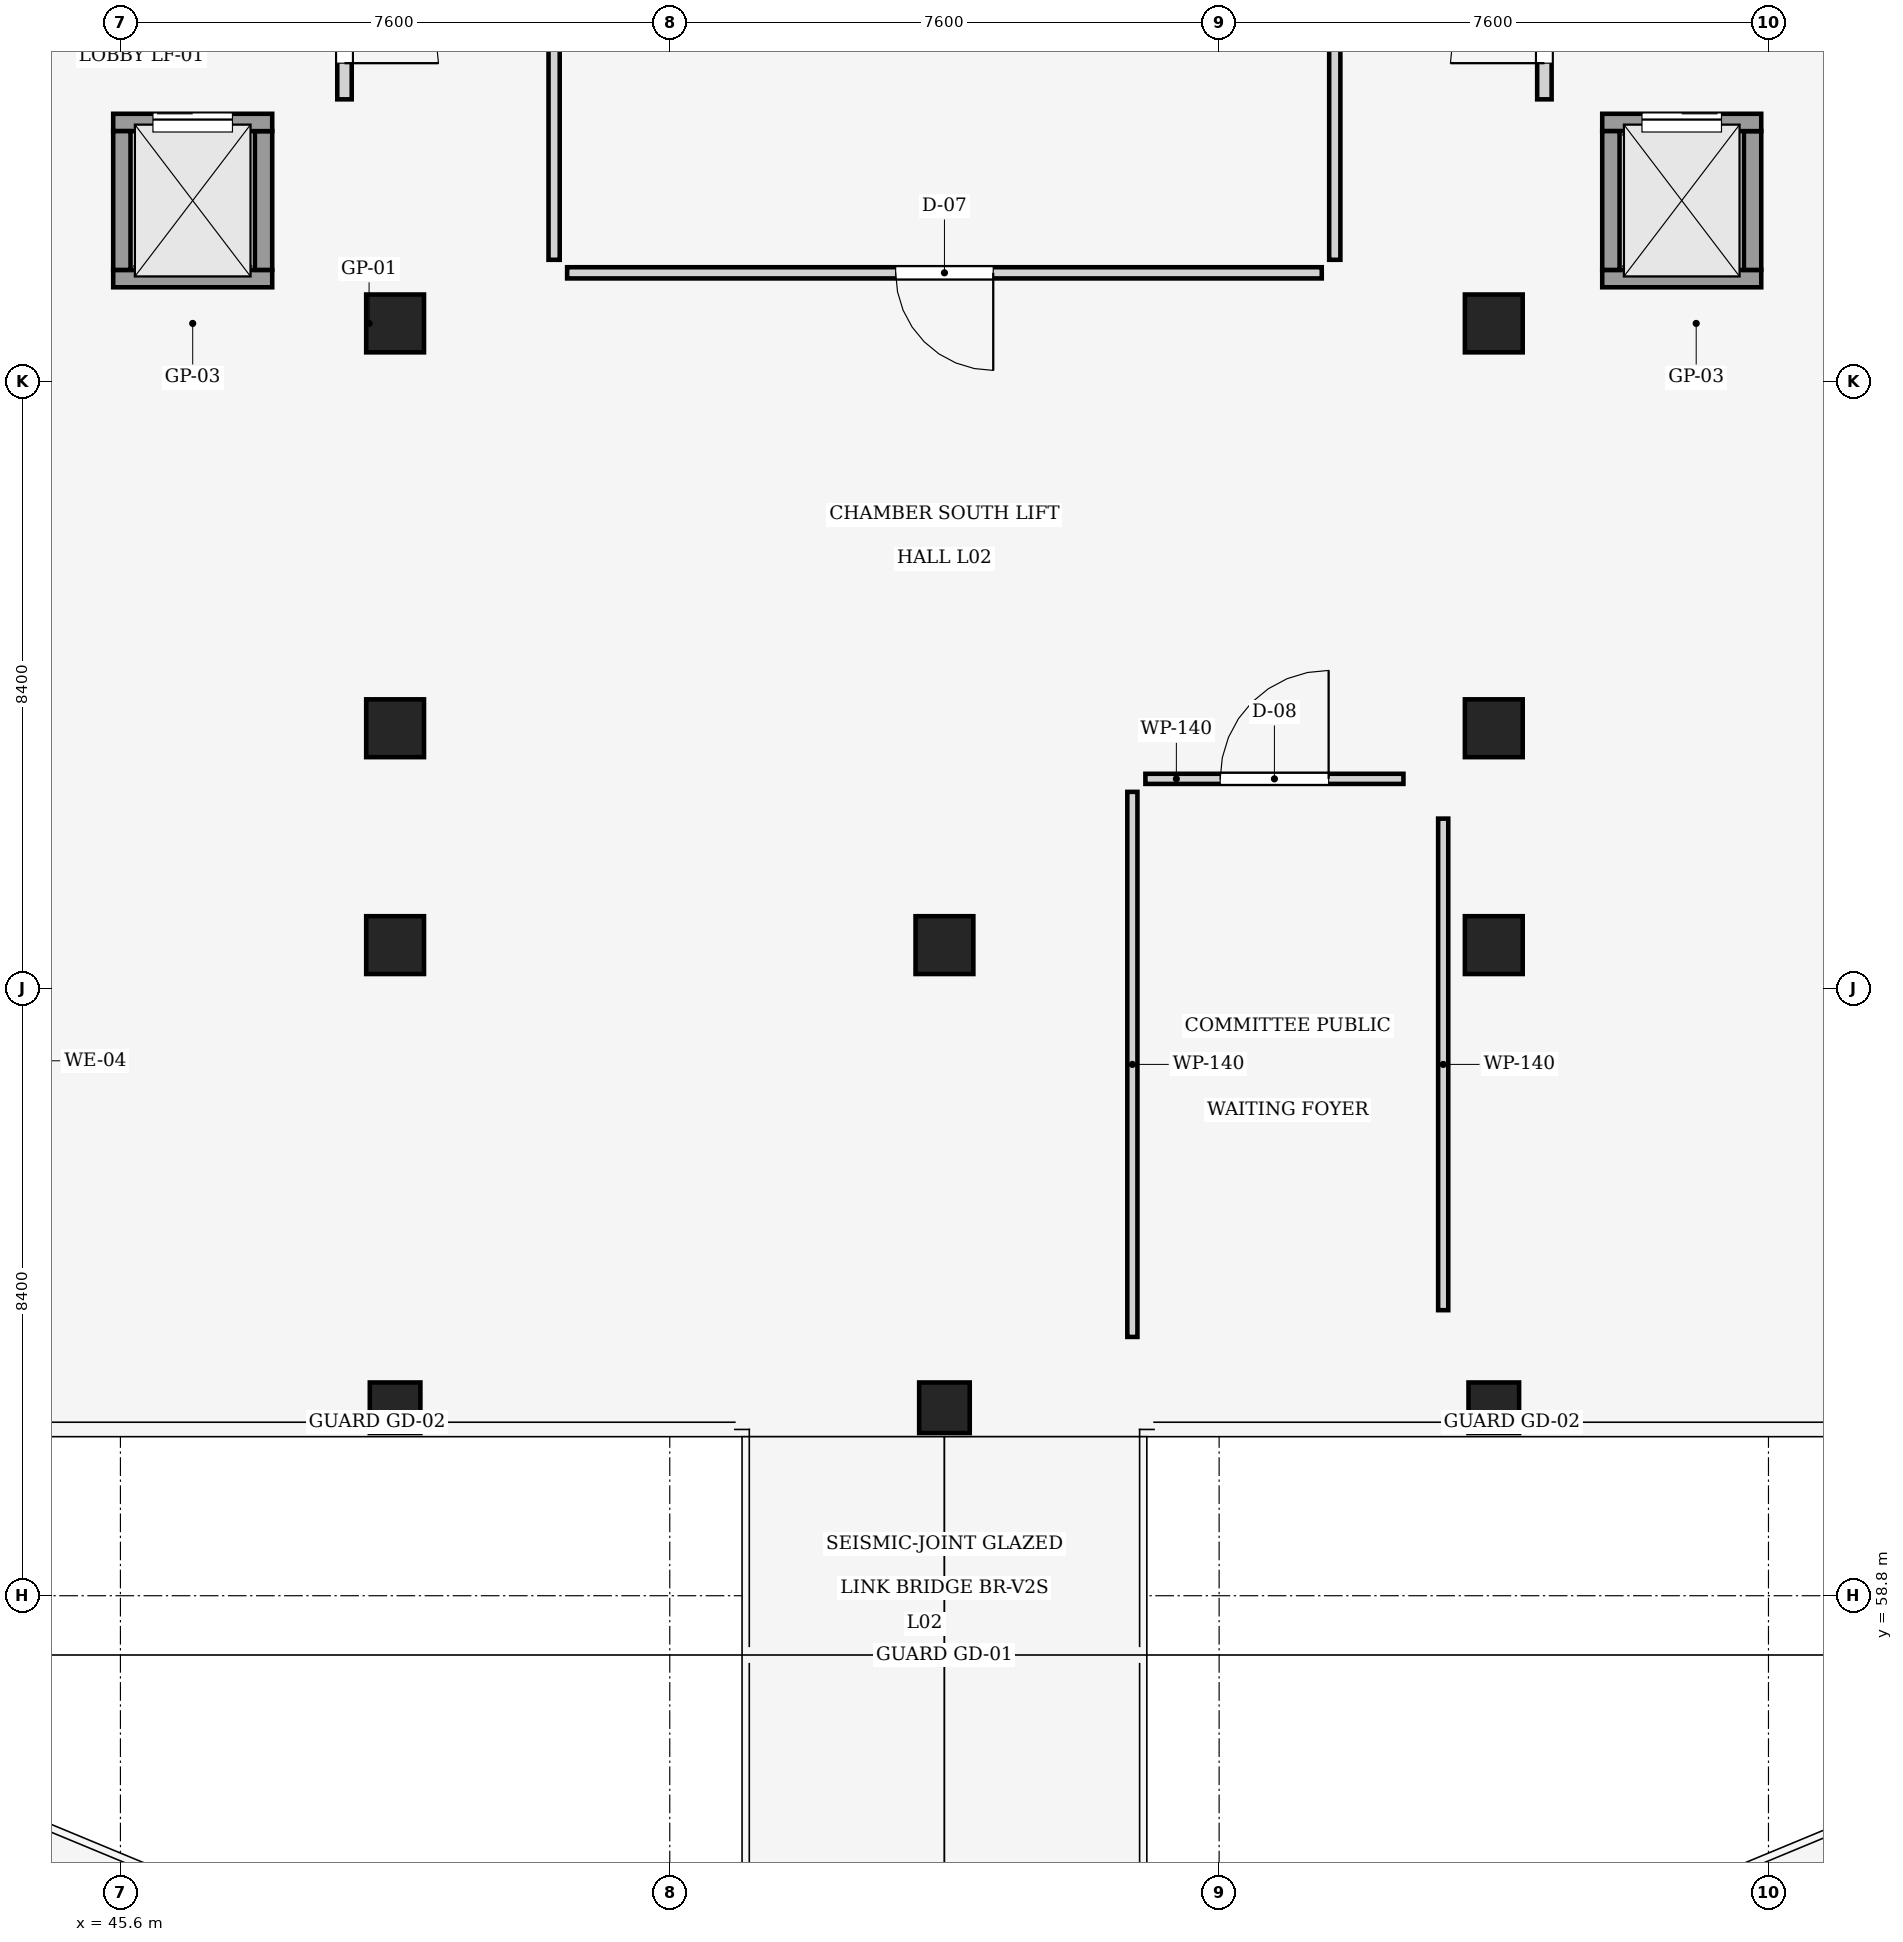
"""IFC4 building model, lengths in metres.
Left out: names, types, materials, properties, quantities, classifications, styles, units other than length and angle.
Written with IfcOpenShell. Run it as: python <this file> out.ifc"""

import sys

from ifc_helpers import new_model, si_unit, direction, frame, frame_2d, origin, origin_2d, place, context, subcontext, project, spatial, rectangle, extrude, element, fill, save


model = new_model("IFC4")
c1 = context("Model", 3, precision=1e-05, world=origin(), true_north=direction((0.0, 1.0)))
c2 = subcontext(c1, "Body", "Model", "MODEL_VIEW")
j1 = project(units=[si_unit("LENGTHUNIT", "METRE"), si_unit("PLANEANGLEUNIT", "RADIAN")], contexts=[c1])
p1 = place(None, origin())
s1 = spatial("IfcSite", under=j1, at=p1, CompositionType="ELEMENT")
p2 = place(p1, origin())
s2 = spatial("IfcBuilding", under=s1, at=p2, CompositionType="ELEMENT")
p3 = place(p2, frame((0.0, 0.0, 9.15)))
s3 = spatial("IfcBuildingStorey", under=s2, at=p3, CompositionType="ELEMENT", Elevation=9.15)
for number, where, z_axis, x_axis in (
    (1, (49.4, 70.8, 0.0), (0.0, 0.0, 1.0), (1.0, 0.0, 0.0)),
    (2, (49.4, 76.4, 0.0), (0.0, 0.0, 1.0), (1.0, 0.0, 0.0)),
    (3, (64.6, 70.8, 0.0), (0.0, 0.0, 1.0), (1.0, 0.0, 0.0)),
    (4, (64.6, 76.4, 0.0), (0.0, 0.0, 1.0), (1.0, 0.0, 0.0)),
    (5, (49.4, 67.8, 0.0), (0.0, 0.0, 1.0), (1.0, 0.0, 0.0)),
    (6, (57.0, 67.8, 0.0), (0.0, 0.0, 1.0), (1.0, 0.0, 0.0)),
    (7, (64.6, 67.8, 0.0), (0.0, 0.0, 1.0), (1.0, 0.0, 0.0)),
):
    element("IfcColumn", number, at=place(p3, frame(where, z_axis=z_axis, x_axis=x_axis)), inside=s3, PredefinedType="COLUMN", context=c2, shape_type="SweptSolid", body=[
        extrude(rectangle(XDim=0.8, YDim=0.8, at=origin_2d()), origin(), (0.0, 0.0, 1.0), 4.05),
    ])
for number, where, z_axis, x_axis in (
    (8, (49.4, 61.4, 0.0), (0.0, 0.0, 1.0), (1.0, 0.0, 0.0)),
    (9, (57.0, 61.4, 0.0), (0.0, 0.0, 1.0), (1.0, 0.0, 0.0)),
    (10, (64.6, 61.4, 0.0), (0.0, 0.0, 1.0), (1.0, 0.0, 0.0)),
):
    element("IfcColumn", number, at=place(p3, frame(where, z_axis=z_axis, x_axis=x_axis)), inside=s3, PredefinedType="COLUMN", context=c2, shape_type="SweptSolid", body=[
        extrude(rectangle(XDim=0.7, YDim=0.7, at=origin_2d()), origin(), (0.0, 0.0, 1.0), 4.05),
    ])
p4 = place(p3, frame((47.7, 77.02, 0.0), z_axis=(0.0, 0.0, 1.0), x_axis=(-1.0, 0.0, 0.0)))
e11 = element("IfcWall", 11, at=p4, inside=s3, PredefinedType="SHEAR", context=c2, shape_type="SweptSolid", body=[
    extrude(rectangle(XDim=2.2, YDim=0.24, at=frame_2d((1.1, 0.0))), origin(), (0.0, 0.0, 1.0), 4.05),
])
p5 = place(p3, frame((47.58, 79.06, 0.0), z_axis=(0.0, 0.0, 1.0), x_axis=(0.0, -1.0, 0.0)))
e12 = element("IfcWall", 12, at=p5, inside=s3, PredefinedType="SHEAR", context=c2, shape_type="SweptSolid", body=[
    extrude(rectangle(XDim=1.92, YDim=0.24, at=frame_2d((0.96, 0.0))), origin(), (0.0, 0.0, 1.0), 4.05),
])
p6 = place(p3, frame((45.5, 79.18, 0.0), z_axis=(0.0, 0.0, 1.0), x_axis=(1.0, 0.0, 0.0)))
e13 = element("IfcWall", 13, at=p6, inside=s3, PredefinedType="SHEAR", context=c2, shape_type="SweptSolid", body=[
    extrude(rectangle(XDim=2.2, YDim=0.24, at=frame_2d((1.1, 0.0))), origin(), (0.0, 0.0, 1.0), 4.05),
])
p7 = place(p6, frame((0.55, 0.0, 0.0)))
e14 = element("IfcOpeningElement", 14, at=p7, cuts=e13, PredefinedType="OPENING", context=c2, shape_type="SweptSolid", body=[
    extrude(rectangle(XDim=1.1, YDim=2.15, at=frame_2d((0.55, 1.075))), frame((0.0, 0.13, 0.0), z_axis=(0.0, -1.0, 0.0), x_axis=(1.0, 0.0, 0.0)), (0.0, 0.0, 1.0), 0.26),
])
p8 = place(p3, frame((45.62, 77.14, 0.0), z_axis=(0.0, 0.0, 1.0), x_axis=(0.0, 1.0, 0.0)))
e15 = element("IfcWall", 15, at=p8, inside=s3, PredefinedType="SHEAR", context=c2, shape_type="SweptSolid", body=[
    extrude(rectangle(XDim=1.92, YDim=0.24, at=frame_2d((0.96, 0.0))), origin(), (0.0, 0.0, 1.0), 4.05),
])
p9 = place(p3, frame((48.7, 81.8, 0.0), z_axis=(0.0, 0.0, 1.0), x_axis=(0.0, -1.0, 0.0)))
e16 = element("IfcWall", 16, at=p9, inside=s3, PredefinedType="PARTITIONING", context=c2, shape_type="SweptSolid", body=[
    extrude(rectangle(XDim=2.3, YDim=0.2, at=frame_2d((1.15, 0.0))), origin(), (0.0, 0.0, 1.0), 2.9),
])
p10 = place(p9, frame((0.5, 0.0, 0.0)))
e17 = element("IfcOpeningElement", 17, at=p10, cuts=e16, PredefinedType="OPENING", context=c2, shape_type="SweptSolid", body=[
    extrude(rectangle(XDim=1.3, YDim=2.2, at=frame_2d((0.65, 1.1))), frame((0.0, 0.11, 0.0), z_axis=(0.0, -1.0, 0.0), x_axis=(1.0, 0.0, 0.0)), (0.0, 0.0, 1.0), 0.22),
])
p11 = place(p3, frame((68.3, 77.02, 0.0), z_axis=(0.0, 0.0, 1.0), x_axis=(-1.0, 0.0, 0.0)))
e18 = element("IfcWall", 18, at=p11, inside=s3, PredefinedType="SHEAR", context=c2, shape_type="SweptSolid", body=[
    extrude(rectangle(XDim=2.2, YDim=0.24, at=frame_2d((1.1, 0.0))), origin(), (0.0, 0.0, 1.0), 4.05),
])
p12 = place(p3, frame((68.18, 79.06, 0.0), z_axis=(0.0, 0.0, 1.0), x_axis=(0.0, -1.0, 0.0)))
e19 = element("IfcWall", 19, at=p12, inside=s3, PredefinedType="SHEAR", context=c2, shape_type="SweptSolid", body=[
    extrude(rectangle(XDim=1.92, YDim=0.24, at=frame_2d((0.96, 0.0))), origin(), (0.0, 0.0, 1.0), 4.05),
])
p13 = place(p3, frame((66.1, 79.18, 0.0), z_axis=(0.0, 0.0, 1.0), x_axis=(1.0, 0.0, 0.0)))
e20 = element("IfcWall", 20, at=p13, inside=s3, PredefinedType="SHEAR", context=c2, shape_type="SweptSolid", body=[
    extrude(rectangle(XDim=2.2, YDim=0.24, at=frame_2d((1.1, 0.0))), origin(), (0.0, 0.0, 1.0), 4.05),
])
p14 = place(p13, frame((0.55, 0.0, 0.0)))
e21 = element("IfcOpeningElement", 21, at=p14, cuts=e20, PredefinedType="OPENING", context=c2, shape_type="SweptSolid", body=[
    extrude(rectangle(XDim=1.1, YDim=2.15, at=frame_2d((0.55, 1.075))), frame((0.0, 0.13, 0.0), z_axis=(0.0, -1.0, 0.0), x_axis=(1.0, 0.0, 0.0)), (0.0, 0.0, 1.0), 0.26),
])
p15 = place(p3, frame((66.22, 77.14, 0.0), z_axis=(0.0, 0.0, 1.0), x_axis=(0.0, 1.0, 0.0)))
e22 = element("IfcWall", 22, at=p15, inside=s3, PredefinedType="SHEAR", context=c2, shape_type="SweptSolid", body=[
    extrude(rectangle(XDim=1.92, YDim=0.24, at=frame_2d((0.96, 0.0))), origin(), (0.0, 0.0, 1.0), 4.05),
])
p16 = place(p3, frame((65.3, 79.5, 0.0), z_axis=(0.0, 0.0, 1.0), x_axis=(0.0, 1.0, 0.0)))
e23 = element("IfcWall", 23, at=p16, inside=s3, PredefinedType="PARTITIONING", context=c2, shape_type="SweptSolid", body=[
    extrude(rectangle(XDim=2.3, YDim=0.2, at=frame_2d((1.15, 0.0))), origin(), (0.0, 0.0, 1.0), 2.9),
])
p17 = place(p16, frame((0.5, 0.0, 0.0)))
e24 = element("IfcOpeningElement", 24, at=p17, cuts=e23, PredefinedType="OPENING", context=c2, shape_type="SweptSolid", body=[
    extrude(rectangle(XDim=1.3, YDim=2.2, at=frame_2d((0.65, 1.1))), frame((0.0, 0.11, 0.0), z_axis=(0.0, -1.0, 0.0), x_axis=(1.0, 0.0, 0.0)), (0.0, 0.0, 1.0), 0.22),
])
p18 = place(p3, frame((62.22, 77.1, 0.0), z_axis=(0.0, 0.0, 1.0), x_axis=(-1.0, 0.0, 0.0)))
e25 = element("IfcWall", 25, at=p18, inside=s3, PredefinedType="PARTITIONING", context=c2, shape_type="SweptSolid", body=[
    extrude(rectangle(XDim=10.44, YDim=0.155, at=frame_2d((5.22, 0.0))), origin(), (0.0, 0.0, 1.0), 3.365),
])
p19 = place(p18, frame((4.545, 0.0, 0.0)))
e26 = element("IfcOpeningElement", 26, at=p19, cuts=e25, PredefinedType="OPENING", context=c2, shape_type="SweptSolid", body=[
    extrude(rectangle(XDim=1.35, YDim=2.1, at=frame_2d((0.675, 1.05))), frame((0.0, 0.087, 0.0), z_axis=(0.0, -1.0, 0.0), x_axis=(1.0, 0.0, 0.0)), (0.0, 0.0, 1.0), 0.175),
])
for number, where, z_axis, x_axis in (
    (27, (62.4, 90.72, 0.0), (0.0, 0.0, 1.0), (0.0, -1.0, 0.0)),
    (28, (51.6, 77.28, 0.0), (0.0, 0.0, 1.0), (0.0, 1.0, 0.0)),
):
    element("IfcWall", number, at=place(p3, frame(where, z_axis=z_axis, x_axis=x_axis)), inside=s3, PredefinedType="PARTITIONING", context=c2, shape_type="SweptSolid", body=[
        extrude(rectangle(XDim=13.44, YDim=0.155, at=frame_2d((6.72, 0.0))), origin(), (0.0, 0.0, 1.0), 3.7),
    ])
p20 = place(p3, frame((59.78, 70.1, 0.0), z_axis=(0.0, 0.0, 1.0), x_axis=(1.0, 0.0, 0.0)))
e29 = element("IfcWall", 29, at=p20, inside=s3, PredefinedType="PARTITIONING", context=c2, shape_type="SweptSolid", body=[
    extrude(rectangle(XDim=3.57, YDim=0.14, at=frame_2d((1.785, 0.0))), origin(), (0.0, 0.0, 1.0), 3.7),
])
p21 = place(p20, frame((1.035, 0.0, 0.0)))
e30 = element("IfcOpeningElement", 30, at=p21, cuts=e29, PredefinedType="OPENING", context=c2, shape_type="SweptSolid", body=[
    extrude(rectangle(XDim=1.5, YDim=2.1, at=frame_2d((0.75, 1.05))), frame((0.0, 0.08, 0.0), z_axis=(0.0, -1.0, 0.0), x_axis=(1.0, 0.0, 0.0)), (0.0, 0.0, 1.0), 0.16),
])
p22 = place(p3, frame((59.6, 62.38, 0.0), z_axis=(0.0, 0.0, 1.0), x_axis=(0.0, 1.0, 0.0)))
e31 = element("IfcWall", 31, at=p22, inside=s3, PredefinedType="PARTITIONING", context=c2, shape_type="SweptSolid", body=[
    extrude(rectangle(XDim=7.54, YDim=0.14, at=frame_2d((3.77, 0.0))), origin(), (0.0, 0.0, 1.0), 3.165),
])
p23 = place(p3, frame((63.9, 69.55, 0.0), z_axis=(0.0, 0.0, 1.0), x_axis=(0.0, -1.0, 0.0)))
e32 = element("IfcWall", 32, at=p23, inside=s3, PredefinedType="PARTITIONING", context=c2, shape_type="SweptSolid", body=[
    extrude(rectangle(XDim=6.8, YDim=0.14, at=frame_2d((3.4, 0.0))), origin(), (0.0, 0.0, 1.0), 3.165),
])
p24 = place(p7, origin())
e33 = element("IfcDoor", 33, at=p24, inside=s3, OperationType="SLIDING_TO_LEFT", PredefinedType="DOOR", context=c2, shape_type="SweptSolid", body=[
    extrude(rectangle(XDim=1.1, YDim=2.15, at=frame_2d((0.55, 1.075))), frame((0.0, 0.025, 0.0), z_axis=(0.0, -1.0, 0.0), x_axis=(1.0, 0.0, 0.0)), (0.0, 0.0, 1.0), 0.05),
])
fill(e14, e33)
p25 = place(p10, origin())
e34 = element("IfcDoor", 34, at=p25, inside=s3, OperationType="SINGLE_SWING_RIGHT", PredefinedType="DOOR", context=c2, shape_type="SweptSolid", body=[
    extrude(rectangle(XDim=1.3, YDim=2.2, at=frame_2d((0.65, 1.1))), frame((0.0, 0.025, 0.0), z_axis=(0.0, -1.0, 0.0), x_axis=(1.0, 0.0, 0.0)), (0.0, 0.0, 1.0), 0.05),
])
fill(e17, e34)
p26 = place(p14, origin())
e35 = element("IfcDoor", 35, at=p26, inside=s3, OperationType="SLIDING_TO_RIGHT", PredefinedType="DOOR", context=c2, shape_type="SweptSolid", body=[
    extrude(rectangle(XDim=1.1, YDim=2.15, at=frame_2d((0.55, 1.075))), frame((0.0, 0.025, 0.0), z_axis=(0.0, -1.0, 0.0), x_axis=(1.0, 0.0, 0.0)), (0.0, 0.0, 1.0), 0.05),
])
fill(e21, e35)
p27 = place(p17, origin())
e36 = element("IfcDoor", 36, at=p27, inside=s3, OperationType="SINGLE_SWING_LEFT", PredefinedType="DOOR", context=c2, shape_type="SweptSolid", body=[
    extrude(rectangle(XDim=1.3, YDim=2.2, at=frame_2d((0.65, 1.1))), frame((0.0, 0.025, 0.0), z_axis=(0.0, -1.0, 0.0), x_axis=(1.0, 0.0, 0.0)), (0.0, 0.0, 1.0), 0.05),
])
fill(e24, e36)
p28 = place(p19, origin())
e37 = element("IfcDoor", 37, at=p28, inside=s3, OperationType="SINGLE_SWING_LEFT", PredefinedType="DOOR", context=c2, shape_type="SweptSolid", body=[
    extrude(rectangle(XDim=1.35, YDim=2.1, at=frame_2d((0.675, 1.05))), frame((0.0, 0.025, 0.0), z_axis=(0.0, -1.0, 0.0), x_axis=(1.0, 0.0, 0.0)), (0.0, 0.0, 1.0), 0.05),
])
fill(e26, e37)
p29 = place(p21, origin())
e38 = element("IfcDoor", 38, at=p29, inside=s3, OperationType="SINGLE_SWING_RIGHT", PredefinedType="DOOR", context=c2, shape_type="SweptSolid", body=[
    extrude(rectangle(XDim=1.5, YDim=2.1, at=frame_2d((0.75, 1.05))), frame((0.0, 0.025, 0.0), z_axis=(0.0, -1.0, 0.0), x_axis=(1.0, 0.0, 0.0)), (0.0, 0.0, 1.0), 0.05),
])
fill(e30, e38)
save(model, sys.argv[1])
